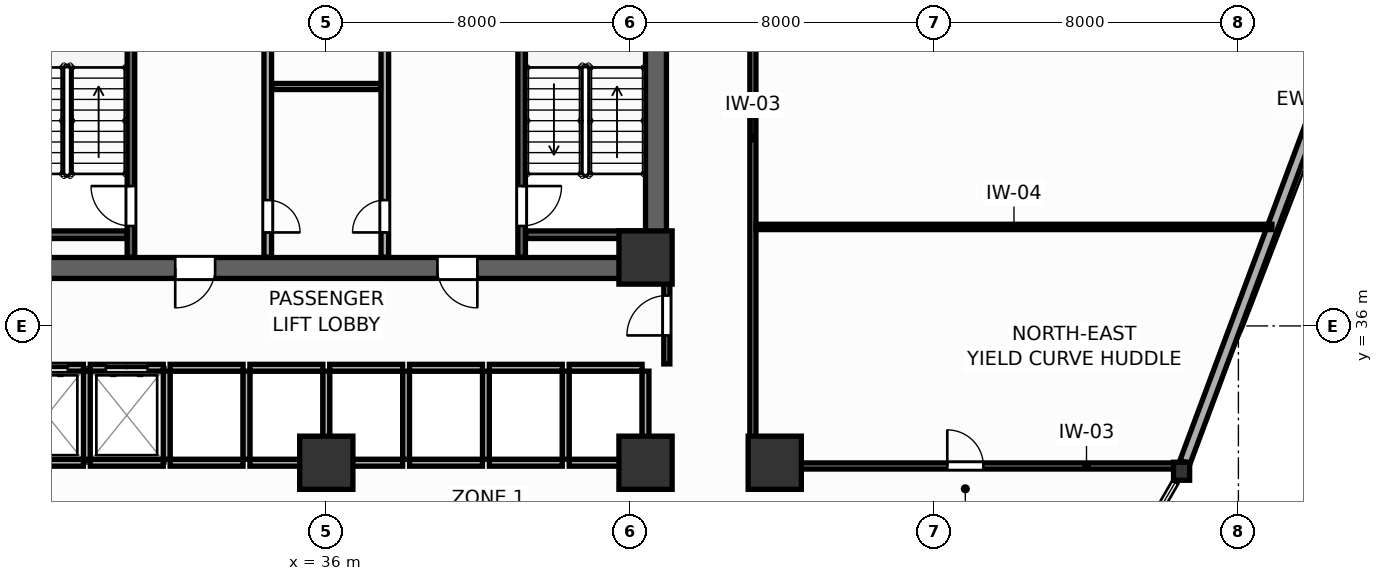
"""IFC4 building model, lengths in metres.
Left out: names, types, materials, properties, quantities, classifications, styles, units other than length and angle.
Written with IfcOpenShell. Run it as: python <this file> out.ifc"""

import sys

from ifc_helpers import new_model, si_unit, direction, frame, frame_2d, origin, origin_2d, place, context, subcontext, project, spatial, rectangle, i_section, extrude, source, transform, mapped, element, fill, save


model = new_model("IFC4")
c1 = context("Model", 3, precision=1e-05, world=origin(), true_north=direction((0.0, 1.0)))
c2 = subcontext(c1, "Body", "Model", "MODEL_VIEW")
j1 = project(units=[si_unit("LENGTHUNIT", "METRE"), si_unit("PLANEANGLEUNIT", "RADIAN")], contexts=[c1])
p1 = place(None, origin())
s1 = spatial("IfcSite", under=j1, at=p1, CompositionType="ELEMENT")
p2 = place(p1, origin())
s2 = spatial("IfcBuilding", under=s1, at=p2, CompositionType="ELEMENT")
p3 = place(p2, frame((0.0, 0.0, 35.7)))
s3 = spatial("IfcBuildingStorey", under=s2, at=p3, CompositionType="ELEMENT", Elevation=35.7)
p4 = place(p3, frame((27.05, 37.525, 0.0), z_axis=(0.0, 0.0, 1.0), x_axis=(1.0, 0.0, 0.0)))
e1 = element("IfcWall", 1, at=p4, inside=s3, PredefinedType="SHEAR", context=c2, shape_type="SweptSolid", body=[
    extrude(rectangle(XDim=17.9, YDim=0.55, at=frame_2d((8.95, 0.0))), origin(), (0.0, 0.0, 1.0), 3.9),
])
p5 = place(p4, frame((4.975, 0.0, 0.0)))
e2 = element("IfcOpeningElement", 2, at=p5, cuts=e1, PredefinedType="OPENING", context=c2, shape_type="SweptSolid", body=[
    extrude(rectangle(XDim=1.05, YDim=2.1, at=frame_2d((0.525, 1.05))), frame((0.0, 0.285, 0.0), z_axis=(0.0, -1.0, 0.0), x_axis=(1.0, 0.0, 0.0)), (0.0, 0.0, 1.0), 0.57),
])
p6 = place(p4, frame((11.875, 0.0, 0.0)))
e3 = element("IfcOpeningElement", 3, at=p6, cuts=e1, PredefinedType="OPENING", context=c2, shape_type="SweptSolid", body=[
    extrude(rectangle(XDim=1.05, YDim=2.1, at=frame_2d((0.525, 1.05))), frame((0.0, 0.285, 0.0), z_axis=(0.0, -1.0, 0.0), x_axis=(1.0, 0.0, 0.0)), (0.0, 0.0, 1.0), 0.57),
])
p7 = place(p3, frame((44.675, 37.8, 0.0), z_axis=(0.0, 0.0, 1.0), x_axis=(0.0, 1.0, 0.0)))
e4 = element("IfcWall", 4, at=p7, inside=s3, PredefinedType="SHEAR", context=c2, shape_type="SweptSolid", body=[
    extrude(rectangle(XDim=9.0, YDim=0.55, at=frame_2d((4.5, 0.0))), origin(), (0.0, 0.0, 1.0), 3.9),
])
m1 = source(origin(), c2, "Body", "SweptSolid", [
    extrude(rectangle(XDim=1.4, YDim=1.4, at=origin_2d()), origin(), (0.0, 0.0, 1.0), 3.9),
])
for number, where, z_axis, x_axis in (
    (5, (44.4, 37.8, 0.0), (0.0, 0.0, 1.0), (1.0, 0.0, 0.0)),
    (6, (44.4, 32.4, 0.0), (0.0, 0.0, 1.0), (1.0, 0.0, 0.0)),
    (7, (36.0, 32.4, 0.0), (0.0, 0.0, 1.0), (1.0, 0.0, 0.0)),
    (8, (47.8, 32.4, 0.0), (0.0, 0.0, 1.0), (1.0, 0.0, 0.0)),
):
    element("IfcColumn", number, at=place(p3, frame(where, z_axis=z_axis, x_axis=x_axis)), inside=s3, PredefinedType="COLUMN", context=c2, shape_type="MappedRepresentation", body=[
        mapped(m1, transform((0.0, 0.0, 0.0), scale=1.0)),
    ])
m2 = source(origin(), c2, "Body", "SweptSolid", [
    extrude(i_section(OverallWidth=0.424, OverallDepth=0.474, WebThickness=0.045, FlangeThickness=0.072, FilletRadius=0.015, at=origin_2d()), origin(), (0.0, 0.0, 1.0), 3.9),
])
p8 = place(p3, frame((58.505, 32.177, 0.0), z_axis=(0.0, 0.0, 1.0), x_axis=(1.0, 0.0, 0.0)))
e9 = element("IfcColumn", 9, at=p8, inside=s3, PredefinedType="COLUMN", context=c2, shape_type="MappedRepresentation", body=[
    mapped(m2, transform((0.0, 0.0, 0.0), scale=1.0)),
])
p9 = place(p3, frame((58.595, 32.418, 0.0), z_axis=(0.0, 0.0, 1.0), x_axis=(0.349439969545, 0.936958754527, 0.0)))
e10 = element("IfcWall", 10, at=p9, inside=s3, PredefinedType="SOLIDWALL", context=c2, shape_type="SweptSolid", body=[
    extrude(rectangle(XDim=18.442, YDim=0.28, at=frame_2d((9.221, 0.0))), origin(), (0.0, 0.0, 1.0), 2.08),
])
p10 = place(p3, frame((30.86, 37.81, 0.0), z_axis=(0.0, 0.0, 1.0), x_axis=(0.0, 1.0, 0.0)))
e11 = element("IfcWall", 11, at=p10, inside=s3, PredefinedType="SHEAR", context=c2, shape_type="SweptSolid", body=[
    extrude(rectangle(XDim=8.98, YDim=0.2, at=frame_2d((4.49, 0.0))), origin(), (0.0, 0.0, 1.0), 3.9),
])
p11 = place(p10, frame((0.82, 0.0, 0.0)))
e12 = element("IfcOpeningElement", 12, at=p11, cuts=e11, PredefinedType="OPENING", context=c2, shape_type="SweptSolid", body=[
    extrude(rectangle(XDim=1.05, YDim=2.1, at=frame_2d((0.525, 1.05))), frame((0.0, 0.11, 0.0), z_axis=(0.0, -1.0, 0.0), x_axis=(1.0, 0.0, 0.0)), (0.0, 0.0, 1.0), 0.22),
])
p12 = place(p3, frame((27.61, 38.4, 0.0), z_axis=(0.0, 0.0, 1.0), x_axis=(1.0, 0.0, 0.0)))
e13 = element("IfcWall", 13, at=p12, inside=s3, PredefinedType="SHEAR", context=c2, shape_type="SweptSolid", body=[
    extrude(rectangle(XDim=3.14, YDim=0.2, at=frame_2d((1.57, 0.0))), origin(), (0.0, 0.0, 1.0), 3.9),
])
p13 = place(p3, frame((41.14, 37.81, 0.0), z_axis=(0.0, 0.0, 1.0), x_axis=(0.0, 1.0, 0.0)))
e14 = element("IfcWall", 14, at=p13, inside=s3, PredefinedType="SHEAR", context=c2, shape_type="SweptSolid", body=[
    extrude(rectangle(XDim=8.98, YDim=0.2, at=frame_2d((4.49, 0.0))), origin(), (0.0, 0.0, 1.0), 3.9),
])
p14 = place(p13, frame((0.82, 0.0, 0.0)))
e15 = element("IfcOpeningElement", 15, at=p14, cuts=e14, PredefinedType="OPENING", context=c2, shape_type="SweptSolid", body=[
    extrude(rectangle(XDim=1.05, YDim=2.1, at=frame_2d((0.525, 1.05))), frame((0.0, 0.11, 0.0), z_axis=(0.0, -1.0, 0.0), x_axis=(1.0, 0.0, 0.0)), (0.0, 0.0, 1.0), 0.22),
])
p15 = place(p3, frame((41.25, 38.4, 0.0), z_axis=(0.0, 0.0, 1.0), x_axis=(1.0, 0.0, 0.0)))
e16 = element("IfcWall", 16, at=p15, inside=s3, PredefinedType="SHEAR", context=c2, shape_type="SweptSolid", body=[
    extrude(rectangle(XDim=3.14, YDim=0.2, at=frame_2d((1.57, 0.0))), origin(), (0.0, 0.0, 1.0), 3.9),
])
p16 = place(p3, frame((34.46, 37.81, 0.0), z_axis=(0.0, 0.0, 1.0), x_axis=(0.0, 1.0, 0.0)))
e17 = element("IfcWall", 17, at=p16, inside=s3, PredefinedType="PARTITIONING", context=c2, shape_type="SweptSolid", body=[
    extrude(rectangle(XDim=8.98, YDim=0.2, at=frame_2d((4.49, 0.0))), origin(), (0.0, 0.0, 1.0), 3.68),
])
p17 = place(p16, frame((0.65, 0.0, 0.0)))
e18 = element("IfcOpeningElement", 18, at=p17, cuts=e17, PredefinedType="OPENING", context=c2, shape_type="SweptSolid", body=[
    extrude(rectangle(XDim=0.85, YDim=2.05, at=frame_2d((0.425, 1.025))), frame((0.0, 0.11, 0.0), z_axis=(0.0, -1.0, 0.0), x_axis=(1.0, 0.0, 0.0)), (0.0, 0.0, 1.0), 0.22),
])
p18 = place(p3, frame((37.54, 37.81, 0.0), z_axis=(0.0, 0.0, 1.0), x_axis=(0.0, 1.0, 0.0)))
e19 = element("IfcWall", 19, at=p18, inside=s3, PredefinedType="PARTITIONING", context=c2, shape_type="SweptSolid", body=[
    extrude(rectangle(XDim=8.98, YDim=0.2, at=frame_2d((4.49, 0.0))), origin(), (0.0, 0.0, 1.0), 3.68),
])
p19 = place(p18, frame((0.65, 0.0, 0.0)))
e20 = element("IfcOpeningElement", 20, at=p19, cuts=e19, PredefinedType="OPENING", context=c2, shape_type="SweptSolid", body=[
    extrude(rectangle(XDim=0.85, YDim=2.05, at=frame_2d((0.425, 1.025))), frame((0.0, 0.11, 0.0), z_axis=(0.0, -1.0, 0.0), x_axis=(1.0, 0.0, 0.0)), (0.0, 0.0, 1.0), 0.22),
])
p20 = place(p3, frame((34.57, 42.3, 0.0), z_axis=(0.0, 0.0, 1.0), x_axis=(1.0, 0.0, 0.0)))
e21 = element("IfcWall", 21, at=p20, inside=s3, PredefinedType="PARTITIONING", context=c2, shape_type="SweptSolid", body=[
    extrude(rectangle(XDim=2.86, YDim=0.16, at=frame_2d((1.43, 0.0))), origin(), (0.0, 0.0, 1.0), 3.68),
])
p21 = place(p3, frame((27.69, 34.9, 0.0), z_axis=(0.0, 0.0, 1.0), x_axis=(1.0, 0.0, 0.0)))
e22 = element("IfcWall", 22, at=p21, inside=s3, PredefinedType="PARTITIONING", context=c2, shape_type="SweptSolid", body=[
    extrude(rectangle(XDim=1.92, YDim=0.18, at=frame_2d((0.96, 0.0))), origin(), (0.0, 0.0, 1.0), 3.68),
])
p22 = place(p21, frame((0.41, 0.0, 0.0)))
e23 = element("IfcOpeningElement", 23, at=p22, cuts=e22, PredefinedType="OPENING", context=c2, shape_type="SweptSolid", body=[
    extrude(rectangle(XDim=1.1, YDim=2.1, at=frame_2d((0.55, 1.05))), frame((0.0, 0.1, 0.0), z_axis=(0.0, -1.0, 0.0), x_axis=(1.0, 0.0, 0.0)), (0.0, 0.0, 1.0), 0.2),
])
p23 = place(p3, frame((27.69, 32.4, 0.0), z_axis=(0.0, 0.0, 1.0), x_axis=(1.0, 0.0, 0.0)))
e24 = element("IfcWall", 24, at=p23, inside=s3, PredefinedType="PARTITIONING", context=c2, shape_type="SweptSolid", body=[
    extrude(rectangle(XDim=1.92, YDim=0.18, at=frame_2d((0.96, 0.0))), origin(), (0.0, 0.0, 1.0), 2.24),
])
p24 = place(p3, frame((29.79, 34.9, 0.0), z_axis=(0.0, 0.0, 1.0), x_axis=(1.0, 0.0, 0.0)))
e25 = element("IfcWall", 25, at=p24, inside=s3, PredefinedType="PARTITIONING", context=c2, shape_type="SweptSolid", body=[
    extrude(rectangle(XDim=1.92, YDim=0.18, at=frame_2d((0.96, 0.0))), origin(), (0.0, 0.0, 1.0), 3.68),
])
p25 = place(p24, frame((0.41, 0.0, 0.0)))
e26 = element("IfcOpeningElement", 26, at=p25, cuts=e25, PredefinedType="OPENING", context=c2, shape_type="SweptSolid", body=[
    extrude(rectangle(XDim=1.1, YDim=2.1, at=frame_2d((0.55, 1.05))), frame((0.0, 0.1, 0.0), z_axis=(0.0, -1.0, 0.0), x_axis=(1.0, 0.0, 0.0)), (0.0, 0.0, 1.0), 0.2),
])
p26 = place(p3, frame((29.79, 32.4, 0.0), z_axis=(0.0, 0.0, 1.0), x_axis=(1.0, 0.0, 0.0)))
e27 = element("IfcWall", 27, at=p26, inside=s3, PredefinedType="PARTITIONING", context=c2, shape_type="SweptSolid", body=[
    extrude(rectangle(XDim=1.92, YDim=0.18, at=frame_2d((0.96, 0.0))), origin(), (0.0, 0.0, 1.0), 2.24),
])
p27 = place(p3, frame((29.7, 32.49, 0.0), z_axis=(0.0, 0.0, 1.0), x_axis=(0.0, 1.0, 0.0)))
e28 = element("IfcWall", 28, at=p27, inside=s3, PredefinedType="PARTITIONING", context=c2, shape_type="SweptSolid", body=[
    extrude(rectangle(XDim=2.32, YDim=0.18, at=frame_2d((1.16, 0.0))), origin(), (0.0, 0.0, 1.0), 3.68),
])
p28 = place(p3, frame((31.89, 34.9, 0.0), z_axis=(0.0, 0.0, 1.0), x_axis=(1.0, 0.0, 0.0)))
e29 = element("IfcWall", 29, at=p28, inside=s3, PredefinedType="PARTITIONING", context=c2, shape_type="SweptSolid", body=[
    extrude(rectangle(XDim=1.92, YDim=0.18, at=frame_2d((0.96, 0.0))), origin(), (0.0, 0.0, 1.0), 3.68),
])
p29 = place(p3, frame((31.89, 32.4, 0.0), z_axis=(0.0, 0.0, 1.0), x_axis=(1.0, 0.0, 0.0)))
e30 = element("IfcWall", 30, at=p29, inside=s3, PredefinedType="PARTITIONING", context=c2, shape_type="SweptSolid", body=[
    extrude(rectangle(XDim=1.92, YDim=0.18, at=frame_2d((0.96, 0.0))), origin(), (0.0, 0.0, 1.0), 2.24),
])
p30 = place(p3, frame((31.8, 32.49, 0.0), z_axis=(0.0, 0.0, 1.0), x_axis=(0.0, 1.0, 0.0)))
e31 = element("IfcWall", 31, at=p30, inside=s3, PredefinedType="PARTITIONING", context=c2, shape_type="SweptSolid", body=[
    extrude(rectangle(XDim=2.32, YDim=0.18, at=frame_2d((1.16, 0.0))), origin(), (0.0, 0.0, 1.0), 3.68),
])
p31 = place(p3, frame((33.99, 34.9, 0.0), z_axis=(0.0, 0.0, 1.0), x_axis=(1.0, 0.0, 0.0)))
e32 = element("IfcWall", 32, at=p31, inside=s3, PredefinedType="PARTITIONING", context=c2, shape_type="SweptSolid", body=[
    extrude(rectangle(XDim=1.92, YDim=0.18, at=frame_2d((0.96, 0.0))), origin(), (0.0, 0.0, 1.0), 3.68),
])
p32 = place(p3, frame((33.99, 32.4, 0.0), z_axis=(0.0, 0.0, 1.0), x_axis=(1.0, 0.0, 0.0)))
e33 = element("IfcWall", 33, at=p32, inside=s3, PredefinedType="PARTITIONING", context=c2, shape_type="SweptSolid", body=[
    extrude(rectangle(XDim=1.92, YDim=0.18, at=frame_2d((0.96, 0.0))), origin(), (0.0, 0.0, 1.0), 2.24),
])
p33 = place(p3, frame((33.9, 32.49, 0.0), z_axis=(0.0, 0.0, 1.0), x_axis=(0.0, 1.0, 0.0)))
e34 = element("IfcWall", 34, at=p33, inside=s3, PredefinedType="PARTITIONING", context=c2, shape_type="SweptSolid", body=[
    extrude(rectangle(XDim=2.32, YDim=0.18, at=frame_2d((1.16, 0.0))), origin(), (0.0, 0.0, 1.0), 3.68),
])
p34 = place(p3, frame((36.09, 34.9, 0.0), z_axis=(0.0, 0.0, 1.0), x_axis=(1.0, 0.0, 0.0)))
e35 = element("IfcWall", 35, at=p34, inside=s3, PredefinedType="PARTITIONING", context=c2, shape_type="SweptSolid", body=[
    extrude(rectangle(XDim=1.92, YDim=0.18, at=frame_2d((0.96, 0.0))), origin(), (0.0, 0.0, 1.0), 3.68),
])
p35 = place(p3, frame((36.09, 32.4, 0.0), z_axis=(0.0, 0.0, 1.0), x_axis=(1.0, 0.0, 0.0)))
e36 = element("IfcWall", 36, at=p35, inside=s3, PredefinedType="PARTITIONING", context=c2, shape_type="SweptSolid", body=[
    extrude(rectangle(XDim=1.92, YDim=0.18, at=frame_2d((0.96, 0.0))), origin(), (0.0, 0.0, 1.0), 2.24),
])
p36 = place(p3, frame((36.0, 32.49, 0.0), z_axis=(0.0, 0.0, 1.0), x_axis=(0.0, 1.0, 0.0)))
e37 = element("IfcWall", 37, at=p36, inside=s3, PredefinedType="PARTITIONING", context=c2, shape_type="SweptSolid", body=[
    extrude(rectangle(XDim=2.32, YDim=0.18, at=frame_2d((1.16, 0.0))), origin(), (0.0, 0.0, 1.0), 3.68),
])
p37 = place(p3, frame((38.19, 34.9, 0.0), z_axis=(0.0, 0.0, 1.0), x_axis=(1.0, 0.0, 0.0)))
e38 = element("IfcWall", 38, at=p37, inside=s3, PredefinedType="PARTITIONING", context=c2, shape_type="SweptSolid", body=[
    extrude(rectangle(XDim=1.92, YDim=0.18, at=frame_2d((0.96, 0.0))), origin(), (0.0, 0.0, 1.0), 3.68),
])
p38 = place(p3, frame((38.19, 32.4, 0.0), z_axis=(0.0, 0.0, 1.0), x_axis=(1.0, 0.0, 0.0)))
e39 = element("IfcWall", 39, at=p38, inside=s3, PredefinedType="PARTITIONING", context=c2, shape_type="SweptSolid", body=[
    extrude(rectangle(XDim=1.92, YDim=0.18, at=frame_2d((0.96, 0.0))), origin(), (0.0, 0.0, 1.0), 2.24),
])
p39 = place(p3, frame((38.1, 32.49, 0.0), z_axis=(0.0, 0.0, 1.0), x_axis=(0.0, 1.0, 0.0)))
e40 = element("IfcWall", 40, at=p39, inside=s3, PredefinedType="PARTITIONING", context=c2, shape_type="SweptSolid", body=[
    extrude(rectangle(XDim=2.32, YDim=0.18, at=frame_2d((1.16, 0.0))), origin(), (0.0, 0.0, 1.0), 3.68),
])
p40 = place(p3, frame((40.29, 34.9, 0.0), z_axis=(0.0, 0.0, 1.0), x_axis=(1.0, 0.0, 0.0)))
e41 = element("IfcWall", 41, at=p40, inside=s3, PredefinedType="PARTITIONING", context=c2, shape_type="SweptSolid", body=[
    extrude(rectangle(XDim=1.92, YDim=0.18, at=frame_2d((0.96, 0.0))), origin(), (0.0, 0.0, 1.0), 3.68),
])
p41 = place(p3, frame((40.29, 32.4, 0.0), z_axis=(0.0, 0.0, 1.0), x_axis=(1.0, 0.0, 0.0)))
e42 = element("IfcWall", 42, at=p41, inside=s3, PredefinedType="PARTITIONING", context=c2, shape_type="SweptSolid", body=[
    extrude(rectangle(XDim=1.92, YDim=0.18, at=frame_2d((0.96, 0.0))), origin(), (0.0, 0.0, 1.0), 2.24),
])
p42 = place(p3, frame((40.2, 32.49, 0.0), z_axis=(0.0, 0.0, 1.0), x_axis=(0.0, 1.0, 0.0)))
e43 = element("IfcWall", 43, at=p42, inside=s3, PredefinedType="PARTITIONING", context=c2, shape_type="SweptSolid", body=[
    extrude(rectangle(XDim=2.32, YDim=0.18, at=frame_2d((1.16, 0.0))), origin(), (0.0, 0.0, 1.0), 3.68),
])
p43 = place(p3, frame((42.39, 34.9, 0.0), z_axis=(0.0, 0.0, 1.0), x_axis=(1.0, 0.0, 0.0)))
e44 = element("IfcWall", 44, at=p43, inside=s3, PredefinedType="PARTITIONING", context=c2, shape_type="SweptSolid", body=[
    extrude(rectangle(XDim=1.92, YDim=0.18, at=frame_2d((0.96, 0.0))), origin(), (0.0, 0.0, 1.0), 3.68),
])
p44 = place(p3, frame((42.39, 32.4, 0.0), z_axis=(0.0, 0.0, 1.0), x_axis=(1.0, 0.0, 0.0)))
e45 = element("IfcWall", 45, at=p44, inside=s3, PredefinedType="PARTITIONING", context=c2, shape_type="SweptSolid", body=[
    extrude(rectangle(XDim=1.92, YDim=0.18, at=frame_2d((0.96, 0.0))), origin(), (0.0, 0.0, 1.0), 2.24),
])
for number, where, z_axis, x_axis in (
    (46, (42.3, 32.49, 0.0), (0.0, 0.0, 1.0), (0.0, 1.0, 0.0)),
    (47, (44.4, 32.49, 0.0), (0.0, 0.0, 1.0), (0.0, 1.0, 0.0)),
):
    element("IfcWall", number, at=place(p3, frame(where, z_axis=z_axis, x_axis=x_axis)), inside=s3, PredefinedType="PARTITIONING", context=c2, shape_type="SweptSolid", body=[
        extrude(rectangle(XDim=2.32, YDim=0.18, at=frame_2d((1.16, 0.0))), origin(), (0.0, 0.0, 1.0), 3.68),
    ])
p45 = place(p3, frame((44.96, 35.0, 0.0), z_axis=(0.0, 0.0, 1.0), x_axis=(0.0, 1.0, 0.0)))
e48 = element("IfcWall", 48, at=p45, inside=s3, PredefinedType="PARTITIONING", context=c2, shape_type="SweptSolid", body=[
    extrude(rectangle(XDim=2.65, YDim=0.16, at=frame_2d((1.325, 0.0))), origin(), (0.0, 0.0, 1.0), 3.68),
])
p46 = place(p45, frame((0.75, 0.0, 0.0)))
e49 = element("IfcOpeningElement", 49, at=p46, cuts=e48, PredefinedType="OPENING", context=c2, shape_type="SweptSolid", body=[
    extrude(rectangle(XDim=1.05, YDim=2.1, at=frame_2d((0.525, 1.05))), frame((0.0, 0.09, 0.0), z_axis=(0.0, -1.0, 0.0), x_axis=(1.0, 0.0, 0.0)), (0.0, 0.0, 1.0), 0.18),
])
p47 = place(p3, frame((47.225, 32.31, 0.0), z_axis=(0.0, 0.0, 1.0), x_axis=(0.0, 1.0, 0.0)))
e50 = element("IfcWall", 50, at=p47, inside=s3, PredefinedType="PARTITIONING", context=c2, shape_type="SweptSolid", body=[
    extrude(rectangle(XDim=24.519, YDim=0.16, at=frame_2d((12.26, 0.0))), origin(), (0.0, 0.0, 1.0), 3.68),
])
p48 = place(p47, frame((17.451, 0.0, 0.0)))
e51 = element("IfcOpeningElement", 51, at=p48, cuts=e50, PredefinedType="OPENING", context=c2, shape_type="SweptSolid", body=[
    extrude(rectangle(XDim=0.95, YDim=2.05, at=frame_2d((0.475, 1.025))), frame((0.0, 0.09, 0.0), z_axis=(0.0, -1.0, 0.0), x_axis=(1.0, 0.0, 0.0)), (0.0, 0.0, 1.0), 0.18),
])
p49 = place(p3, frame((47.307, 32.315, 0.0), z_axis=(0.0, 0.0, 1.0), x_axis=(1.0, 0.0, 0.0)))
e52 = element("IfcWall", 52, at=p49, inside=s3, PredefinedType="PARTITIONING", context=c2, shape_type="SweptSolid", body=[
    extrude(rectangle(XDim=11.23, YDim=0.16, at=frame_2d((5.615, 0.0))), origin(), (0.0, 0.0, 1.0), 2.24),
])
p50 = place(p49, frame((5.033, 0.0, 0.0)))
e53 = element("IfcOpeningElement", 53, at=p50, cuts=e52, PredefinedType="OPENING", context=c2, shape_type="SweptSolid", body=[
    extrude(rectangle(XDim=0.95, YDim=2.05, at=frame_2d((0.475, 1.025))), frame((0.0, 0.09, 0.0), z_axis=(0.0, -1.0, 0.0), x_axis=(1.0, 0.0, 0.0)), (0.0, 0.0, 1.0), 0.18),
])
p51 = place(p3, frame((47.307, 38.605, 0.0), z_axis=(0.0, 0.0, 1.0), x_axis=(1.0, 0.0, 0.0)))
e54 = element("IfcWall", 54, at=p51, inside=s3, PredefinedType="PARTITIONING", context=c2, shape_type="SweptSolid", body=[
    extrude(rectangle(XDim=13.575, YDim=0.14, at=frame_2d((6.788, 0.0))), origin(), (0.0, 0.0, 1.0), 3.68),
])
p52 = place(p11, origin())
e55 = element("IfcDoor", 55, at=p52, inside=s3, OperationType="SINGLE_SWING_RIGHT", PredefinedType="DOOR", context=c2, shape_type="SweptSolid", body=[
    extrude(rectangle(XDim=1.05, YDim=2.1, at=frame_2d((0.525, 1.05))), frame((0.0, 0.025, 0.0), z_axis=(0.0, -1.0, 0.0), x_axis=(1.0, 0.0, 0.0)), (0.0, 0.0, 1.0), 0.05),
])
fill(e12, e55)
p53 = place(p14, frame((1.05, 0.0, 0.0), z_axis=(0.0, 0.0, 1.0), x_axis=(-1.0, 0.0, 0.0)))
e56 = element("IfcDoor", 56, at=p53, inside=s3, OperationType="SINGLE_SWING_LEFT", PredefinedType="DOOR", context=c2, shape_type="SweptSolid", body=[
    extrude(rectangle(XDim=1.05, YDim=2.1, at=frame_2d((0.525, 1.05))), frame((0.0, 0.025, 0.0), z_axis=(0.0, -1.0, 0.0), x_axis=(1.0, 0.0, 0.0)), (0.0, 0.0, 1.0), 0.05),
])
fill(e15, e56)
p54 = place(p17, frame((0.85, 0.0, 0.0), z_axis=(0.0, 0.0, 1.0), x_axis=(-1.0, 0.0, 0.0)))
e57 = element("IfcDoor", 57, at=p54, inside=s3, OperationType="SINGLE_SWING_RIGHT", PredefinedType="DOOR", context=c2, shape_type="SweptSolid", body=[
    extrude(rectangle(XDim=0.85, YDim=2.05, at=frame_2d((0.425, 1.025))), frame((0.0, 0.025, 0.0), z_axis=(0.0, -1.0, 0.0), x_axis=(1.0, 0.0, 0.0)), (0.0, 0.0, 1.0), 0.05),
])
fill(e18, e57)
p55 = place(p19, origin())
e58 = element("IfcDoor", 58, at=p55, inside=s3, OperationType="SINGLE_SWING_LEFT", PredefinedType="DOOR", context=c2, shape_type="SweptSolid", body=[
    extrude(rectangle(XDim=0.85, YDim=2.05, at=frame_2d((0.425, 1.025))), frame((0.0, 0.025, 0.0), z_axis=(0.0, -1.0, 0.0), x_axis=(1.0, 0.0, 0.0)), (0.0, 0.0, 1.0), 0.05),
])
fill(e20, e58)
p56 = place(p22, origin())
e59 = element("IfcDoor", 59, at=p56, inside=s3, OperationType="DOUBLE_DOOR_SLIDING", PredefinedType="DOOR", context=c2, shape_type="SweptSolid", body=[
    extrude(rectangle(XDim=1.1, YDim=2.1, at=frame_2d((0.55, 1.05))), frame((0.0, 0.025, 0.0), z_axis=(0.0, -1.0, 0.0), x_axis=(1.0, 0.0, 0.0)), (0.0, 0.0, 1.0), 0.05),
])
fill(e23, e59)
p57 = place(p25, origin())
e60 = element("IfcDoor", 60, at=p57, inside=s3, OperationType="DOUBLE_DOOR_SLIDING", PredefinedType="DOOR", context=c2, shape_type="SweptSolid", body=[
    extrude(rectangle(XDim=1.1, YDim=2.1, at=frame_2d((0.55, 1.05))), frame((0.0, 0.025, 0.0), z_axis=(0.0, -1.0, 0.0), x_axis=(1.0, 0.0, 0.0)), (0.0, 0.0, 1.0), 0.05),
])
fill(e26, e60)
p58 = place(p46, origin())
e61 = element("IfcDoor", 61, at=p58, inside=s3, OperationType="SINGLE_SWING_LEFT", PredefinedType="DOOR", context=c2, shape_type="SweptSolid", body=[
    extrude(rectangle(XDim=1.05, YDim=2.1, at=frame_2d((0.525, 1.05))), frame((0.0, 0.025, 0.0), z_axis=(0.0, -1.0, 0.0), x_axis=(1.0, 0.0, 0.0)), (0.0, 0.0, 1.0), 0.05),
])
fill(e49, e61)
p59 = place(p50, origin())
e62 = element("IfcDoor", 62, at=p59, inside=s3, OperationType="SINGLE_SWING_LEFT", PredefinedType="DOOR", context=c2, shape_type="SweptSolid", body=[
    extrude(rectangle(XDim=0.95, YDim=2.05, at=frame_2d((0.475, 1.025))), frame((0.0, 0.025, 0.0), z_axis=(0.0, -1.0, 0.0), x_axis=(1.0, 0.0, 0.0)), (0.0, 0.0, 1.0), 0.05),
])
fill(e53, e62)
p60 = place(p5, frame((1.05, 0.0, 0.0), z_axis=(0.0, 0.0, 1.0), x_axis=(-1.0, 0.0, 0.0)))
e63 = element("IfcDoor", 63, at=p60, inside=s3, OperationType="SINGLE_SWING_RIGHT", PredefinedType="DOOR", context=c2, shape_type="SweptSolid", body=[
    extrude(rectangle(XDim=1.05, YDim=2.1, at=frame_2d((0.525, 1.05))), frame((0.0, 0.025, 0.0), z_axis=(0.0, -1.0, 0.0), x_axis=(1.0, 0.0, 0.0)), (0.0, 0.0, 1.0), 0.05),
])
fill(e2, e63)
p61 = place(p6, frame((1.05, 0.0, 0.0), z_axis=(0.0, 0.0, 1.0), x_axis=(-1.0, 0.0, 0.0)))
e64 = element("IfcDoor", 64, at=p61, inside=s3, OperationType="SINGLE_SWING_LEFT", PredefinedType="DOOR", context=c2, shape_type="SweptSolid", body=[
    extrude(rectangle(XDim=1.05, YDim=2.1, at=frame_2d((0.525, 1.05))), frame((0.0, 0.025, 0.0), z_axis=(0.0, -1.0, 0.0), x_axis=(1.0, 0.0, 0.0)), (0.0, 0.0, 1.0), 0.05),
])
fill(e3, e64)
save(model, sys.argv[1])
